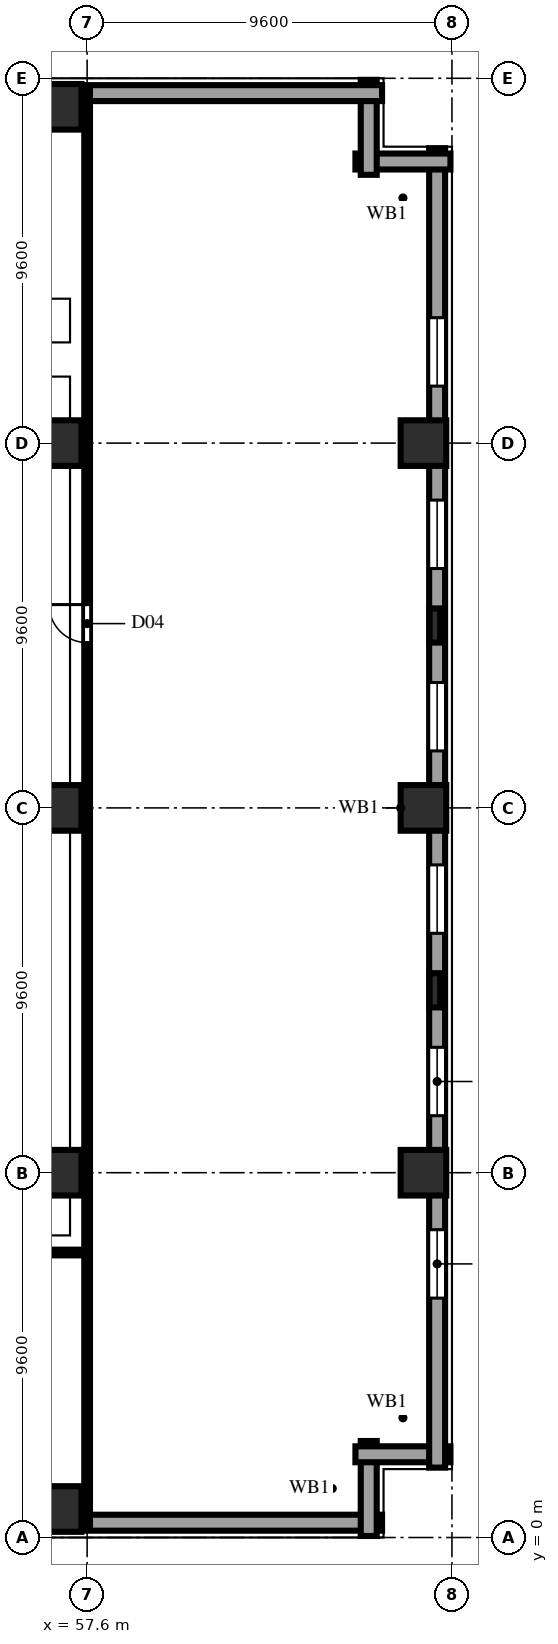
"""IFC4 building model, lengths in metres.
Left out: names, types, materials, properties, quantities, classifications, styles, units other than length and angle.
Written with IfcOpenShell. Run it as: python <this file> out.ifc"""

import sys

from ifc_helpers import new_model, si_unit, direction, frame, frame_2d, origin, origin_2d, place, context, subcontext, project, spatial, rectangle, extrude, element, fill, save


model = new_model("IFC4")
c1 = context("Model", 3, precision=1e-05, world=origin(), true_north=direction((0.0, 1.0)))
c2 = subcontext(c1, "Body", "Model", "MODEL_VIEW")
j1 = project(units=[si_unit("LENGTHUNIT", "METRE"), si_unit("PLANEANGLEUNIT", "RADIAN")], contexts=[c1])
p1 = place(None, origin())
s1 = spatial("IfcSite", under=j1, at=p1, CompositionType="ELEMENT")
p2 = place(p1, origin())
s2 = spatial("IfcBuilding", under=s1, at=p2, CompositionType="ELEMENT")
p3 = place(p2, frame((0.0, 0.0, 54.6)))
s3 = spatial("IfcBuildingStorey", under=s2, at=p3, CompositionType="ELEMENT", Elevation=54.6)
for number, where, z_axis, x_axis in (
    (1, (56.85, 0.75, 0.0), (0.0, 0.0, 1.0), (1.0, 0.0, 0.0)),
    (2, (56.85, 9.6, 0.0), (0.0, 0.0, 1.0), (1.0, 0.0, 0.0)),
    (3, (56.85, 19.2, 0.0), (0.0, 0.0, 1.0), (1.0, 0.0, 0.0)),
    (4, (56.85, 28.8, 0.0), (0.0, 0.0, 1.0), (1.0, 0.0, 0.0)),
    (5, (56.85, 37.65, 0.0), (0.0, 0.0, 1.0), (1.0, 0.0, 0.0)),
    (6, (66.45, 9.6, 0.0), (0.0, 0.0, 1.0), (1.0, 0.0, 0.0)),
    (7, (66.45, 19.2, 0.0), (0.0, 0.0, 1.0), (1.0, 0.0, 0.0)),
    (8, (66.45, 28.8, 0.0), (0.0, 0.0, 1.0), (1.0, 0.0, 0.0)),
):
    element("IfcColumn", number, at=place(p3, frame(where, z_axis=z_axis, x_axis=x_axis)), inside=s3, PredefinedType="COLUMN", context=c2, shape_type="SweptSolid", body=[
        extrude(rectangle(XDim=1.2, YDim=1.2, at=origin_2d()), origin(), (0.0, 0.0, 1.0), 3.8),
    ])
for number, where, z_axis, x_axis in (
    (9, (66.75, 14.4, 0.0), (0.0, 0.0, 1.0), (0.0, 1.0, 0.0)),
    (10, (66.75, 24.0, 0.0), (0.0, 0.0, 1.0), (0.0, 1.0, 0.0)),
):
    element("IfcColumn", number, at=place(p3, frame(where, z_axis=z_axis, x_axis=x_axis)), inside=s3, PredefinedType="PILASTER", context=c2, shape_type="SweptSolid", body=[
        extrude(rectangle(XDim=0.9, YDim=0.28, at=origin_2d()), origin(), (0.0, 0.0, 1.0), 3.8),
    ])
p4 = place(p3, frame((1.84, 0.39, 0.0), z_axis=(0.0, 0.0, 1.0), x_axis=(1.0, 0.0, 0.0)))
e11 = element("IfcWall", 11, at=p4, inside=s3, PredefinedType="SOLIDWALL", context=c2, shape_type="SweptSolid", body=[
    extrude(rectangle(XDim=63.52, YDim=0.42, at=frame_2d((31.76, 0.0))), origin(), (0.0, 0.0, 1.0), 3.54),
])
p5 = place(p4, frame((4.16, 0.0, 0.85)))
e12 = element("IfcOpeningElement", 12, at=p5, cuts=e11, PredefinedType="OPENING", context=c2, shape_type="SweptSolid", body=[
    extrude(rectangle(XDim=2.4, YDim=1.85, at=frame_2d((1.2, 0.925))), frame((0.0, 0.222, 0.0), z_axis=(0.0, -1.0, 0.0), x_axis=(1.0, 0.0, 0.0)), (0.0, 0.0, 1.0), 0.444),
])
p6 = place(p4, frame((8.96, 0.0, 0.85)))
e13 = element("IfcOpeningElement", 13, at=p6, cuts=e11, PredefinedType="OPENING", context=c2, shape_type="SweptSolid", body=[
    extrude(rectangle(XDim=2.4, YDim=1.85, at=frame_2d((1.2, 0.925))), frame((0.0, 0.222, 0.0), z_axis=(0.0, -1.0, 0.0), x_axis=(1.0, 0.0, 0.0)), (0.0, 0.0, 1.0), 0.444),
])
p7 = place(p4, frame((13.76, 0.0, 0.85)))
e14 = element("IfcOpeningElement", 14, at=p7, cuts=e11, PredefinedType="OPENING", context=c2, shape_type="SweptSolid", body=[
    extrude(rectangle(XDim=2.4, YDim=1.85, at=frame_2d((1.2, 0.925))), frame((0.0, 0.222, 0.0), z_axis=(0.0, -1.0, 0.0), x_axis=(1.0, 0.0, 0.0)), (0.0, 0.0, 1.0), 0.444),
])
p8 = place(p4, frame((18.56, 0.0, 0.85)))
e15 = element("IfcOpeningElement", 15, at=p8, cuts=e11, PredefinedType="OPENING", context=c2, shape_type="SweptSolid", body=[
    extrude(rectangle(XDim=2.4, YDim=1.85, at=frame_2d((1.2, 0.925))), frame((0.0, 0.222, 0.0), z_axis=(0.0, -1.0, 0.0), x_axis=(1.0, 0.0, 0.0)), (0.0, 0.0, 1.0), 0.444),
])
p9 = place(p4, frame((23.36, 0.0, 0.85)))
e16 = element("IfcOpeningElement", 16, at=p9, cuts=e11, PredefinedType="OPENING", context=c2, shape_type="SweptSolid", body=[
    extrude(rectangle(XDim=2.4, YDim=1.85, at=frame_2d((1.2, 0.925))), frame((0.0, 0.222, 0.0), z_axis=(0.0, -1.0, 0.0), x_axis=(1.0, 0.0, 0.0)), (0.0, 0.0, 1.0), 0.444),
])
p10 = place(p4, frame((28.16, 0.0, 0.85)))
e17 = element("IfcOpeningElement", 17, at=p10, cuts=e11, PredefinedType="OPENING", context=c2, shape_type="SweptSolid", body=[
    extrude(rectangle(XDim=2.4, YDim=1.85, at=frame_2d((1.2, 0.925))), frame((0.0, 0.222, 0.0), z_axis=(0.0, -1.0, 0.0), x_axis=(1.0, 0.0, 0.0)), (0.0, 0.0, 1.0), 0.444),
])
for number, where, z_axis, x_axis in (
    (18, (65.01, 0.04, 0.0), (0.0, 0.0, 1.0), (0.0, 1.0, 0.0)),
    (19, (64.66, 2.19, 0.0), (0.0, 0.0, 1.0), (1.0, 0.0, 0.0)),
):
    element("IfcWall", number, at=place(p3, frame(where, z_axis=z_axis, x_axis=x_axis)), inside=s3, PredefinedType="SOLIDWALL", context=c2, shape_type="SweptSolid", body=[
        extrude(rectangle(XDim=2.5, YDim=0.42, at=frame_2d((1.25, 0.0))), origin(), (0.0, 0.0, 1.0), 3.54),
    ])
p11 = place(p3, frame((66.81, 1.84, 0.0), z_axis=(0.0, 0.0, 1.0), x_axis=(0.0, 1.0, 0.0)))
e20 = element("IfcWall", 20, at=p11, inside=s3, PredefinedType="SOLIDWALL", context=c2, shape_type="SweptSolid", body=[
    extrude(rectangle(XDim=34.72, YDim=0.42, at=frame_2d((17.36, 0.0))), origin(), (0.0, 0.0, 1.0), 3.54),
])
p12 = place(p11, frame((4.46, 0.0, 0.85)))
e21 = element("IfcOpeningElement", 21, at=p12, cuts=e20, PredefinedType="OPENING", context=c2, shape_type="SweptSolid", body=[
    extrude(rectangle(XDim=1.8, YDim=1.85, at=frame_2d((0.9, 0.925))), frame((0.0, 0.222, 0.0), z_axis=(0.0, -1.0, 0.0), x_axis=(1.0, 0.0, 0.0)), (0.0, 0.0, 1.0), 0.444),
])
p13 = place(p11, frame((9.26, 0.0, 0.85)))
e22 = element("IfcOpeningElement", 22, at=p13, cuts=e20, PredefinedType="OPENING", context=c2, shape_type="SweptSolid", body=[
    extrude(rectangle(XDim=1.8, YDim=1.85, at=frame_2d((0.9, 0.925))), frame((0.0, 0.222, 0.0), z_axis=(0.0, -1.0, 0.0), x_axis=(1.0, 0.0, 0.0)), (0.0, 0.0, 1.0), 0.444),
])
p14 = place(p11, frame((14.06, 0.0, 0.85)))
e23 = element("IfcOpeningElement", 23, at=p14, cuts=e20, PredefinedType="OPENING", context=c2, shape_type="SweptSolid", body=[
    extrude(rectangle(XDim=1.8, YDim=1.85, at=frame_2d((0.9, 0.925))), frame((0.0, 0.222, 0.0), z_axis=(0.0, -1.0, 0.0), x_axis=(1.0, 0.0, 0.0)), (0.0, 0.0, 1.0), 0.444),
])
p15 = place(p11, frame((18.86, 0.0, 0.85)))
e24 = element("IfcOpeningElement", 24, at=p15, cuts=e20, PredefinedType="OPENING", context=c2, shape_type="SweptSolid", body=[
    extrude(rectangle(XDim=1.8, YDim=1.85, at=frame_2d((0.9, 0.925))), frame((0.0, 0.222, 0.0), z_axis=(0.0, -1.0, 0.0), x_axis=(1.0, 0.0, 0.0)), (0.0, 0.0, 1.0), 0.444),
])
p16 = place(p11, frame((23.66, 0.0, 0.85)))
e25 = element("IfcOpeningElement", 25, at=p16, cuts=e20, PredefinedType="OPENING", context=c2, shape_type="SweptSolid", body=[
    extrude(rectangle(XDim=1.8, YDim=1.85, at=frame_2d((0.9, 0.925))), frame((0.0, 0.222, 0.0), z_axis=(0.0, -1.0, 0.0), x_axis=(1.0, 0.0, 0.0)), (0.0, 0.0, 1.0), 0.444),
])
p17 = place(p11, frame((28.46, 0.0, 0.85)))
e26 = element("IfcOpeningElement", 26, at=p17, cuts=e20, PredefinedType="OPENING", context=c2, shape_type="SweptSolid", body=[
    extrude(rectangle(XDim=1.8, YDim=1.85, at=frame_2d((0.9, 0.925))), frame((0.0, 0.222, 0.0), z_axis=(0.0, -1.0, 0.0), x_axis=(1.0, 0.0, 0.0)), (0.0, 0.0, 1.0), 0.444),
])
for number, where, z_axis, x_axis in (
    (27, (67.16, 36.21, 0.0), (0.0, 0.0, 1.0), (-1.0, 0.0, 0.0)),
    (28, (65.01, 35.86, 0.0), (0.0, 0.0, 1.0), (0.0, 1.0, 0.0)),
):
    element("IfcWall", number, at=place(p3, frame(where, z_axis=z_axis, x_axis=x_axis)), inside=s3, PredefinedType="SOLIDWALL", context=c2, shape_type="SweptSolid", body=[
        extrude(rectangle(XDim=2.5, YDim=0.42, at=frame_2d((1.25, 0.0))), origin(), (0.0, 0.0, 1.0), 3.54),
    ])
p18 = place(p3, frame((65.36, 38.01, 0.0), z_axis=(0.0, 0.0, 1.0), x_axis=(-1.0, 0.0, 0.0)))
e29 = element("IfcWall", 29, at=p18, inside=s3, PredefinedType="SOLIDWALL", context=c2, shape_type="SweptSolid", body=[
    extrude(rectangle(XDim=27.7, YDim=0.42, at=frame_2d((13.85, 0.0))), origin(), (0.0, 0.0, 1.0), 3.54),
])
p19 = place(p3, frame((0.22, 7.5, 0.0), z_axis=(0.0, 0.0, 1.0), x_axis=(1.0, 0.0, 0.0)))
e30 = element("IfcWall", 30, at=p19, inside=s3, PredefinedType="PARTITIONING", context=c2, shape_type="SweptSolid", body=[
    extrude(rectangle(XDim=57.38, YDim=0.15, at=frame_2d((28.69, 0.0))), origin(), (0.0, 0.0, 1.0), 3.54),
])
p20 = place(p19, frame((13.68, 0.0, 0.0)))
e31 = element("IfcOpeningElement", 31, at=p20, cuts=e30, PredefinedType="OPENING", context=c2, shape_type="SweptSolid", body=[
    extrude(rectangle(XDim=1.0, YDim=2.2, at=frame_2d((0.5, 1.1))), frame((0.0, 0.087, 0.0), z_axis=(0.0, -1.0, 0.0), x_axis=(1.0, 0.0, 0.0)), (0.0, 0.0, 1.0), 0.174),
])
p21 = place(p19, frame((23.28, 0.0, 0.0)))
e32 = element("IfcOpeningElement", 32, at=p21, cuts=e30, PredefinedType="OPENING", context=c2, shape_type="SweptSolid", body=[
    extrude(rectangle(XDim=1.0, YDim=2.2, at=frame_2d((0.5, 1.1))), frame((0.0, 0.087, 0.0), z_axis=(0.0, -1.0, 0.0), x_axis=(1.0, 0.0, 0.0)), (0.0, 0.0, 1.0), 0.174),
])
p22 = place(p19, frame((51.23, 0.0, 0.0)))
e33 = element("IfcOpeningElement", 33, at=p22, cuts=e30, PredefinedType="OPENING", context=c2, shape_type="SweptSolid", body=[
    extrude(rectangle(XDim=1.2, YDim=2.2, at=frame_2d((0.6, 1.1))), frame((0.0, 0.087, 0.0), z_axis=(0.0, -1.0, 0.0), x_axis=(1.0, 0.0, 0.0)), (0.0, 0.0, 1.0), 0.174),
])
p23 = place(p3, frame((57.6, 0.22, 0.0), z_axis=(0.0, 0.0, 1.0), x_axis=(0.0, 1.0, 0.0)))
e34 = element("IfcWall", 34, at=p23, inside=s3, PredefinedType="PARTITIONING", context=c2, shape_type="SweptSolid", body=[
    extrude(rectangle(XDim=37.96, YDim=0.15, at=frame_2d((18.98, 0.0))), origin(), (0.0, 0.0, 1.0), 3.54),
])
p24 = place(p23, frame((23.33, 0.0, 0.0)))
e35 = element("IfcOpeningElement", 35, at=p24, cuts=e34, PredefinedType="OPENING", context=c2, shape_type="SweptSolid", body=[
    extrude(rectangle(XDim=1.0, YDim=2.2, at=frame_2d((0.5, 1.1))), frame((0.0, 0.087, 0.0), z_axis=(0.0, -1.0, 0.0), x_axis=(1.0, 0.0, 0.0)), (0.0, 0.0, 1.0), 0.174),
])
p25 = place(p12, origin())
e36 = element("IfcWindow", 36, at=p25, inside=s3, PartitioningType="DOUBLE_PANEL_VERTICAL", PredefinedType="WINDOW", context=c2, shape_type="SweptSolid", body=[
    extrude(rectangle(XDim=1.8, YDim=1.85, at=frame_2d((0.9, 0.925))), frame((0.0, 0.11, 0.0), z_axis=(0.0, -1.0, 0.0), x_axis=(1.0, 0.0, 0.0)), (0.0, 0.0, 1.0), 0.06),
])
fill(e21, e36)
p26 = place(p13, origin())
e37 = element("IfcWindow", 37, at=p26, inside=s3, PartitioningType="DOUBLE_PANEL_VERTICAL", PredefinedType="WINDOW", context=c2, shape_type="SweptSolid", body=[
    extrude(rectangle(XDim=1.8, YDim=1.85, at=frame_2d((0.9, 0.925))), frame((0.0, 0.11, 0.0), z_axis=(0.0, -1.0, 0.0), x_axis=(1.0, 0.0, 0.0)), (0.0, 0.0, 1.0), 0.06),
])
fill(e22, e37)
p27 = place(p14, origin())
e38 = element("IfcWindow", 38, at=p27, inside=s3, PartitioningType="DOUBLE_PANEL_VERTICAL", PredefinedType="WINDOW", context=c2, shape_type="SweptSolid", body=[
    extrude(rectangle(XDim=1.8, YDim=1.85, at=frame_2d((0.9, 0.925))), frame((0.0, 0.11, 0.0), z_axis=(0.0, -1.0, 0.0), x_axis=(1.0, 0.0, 0.0)), (0.0, 0.0, 1.0), 0.06),
])
fill(e23, e38)
p28 = place(p15, origin())
e39 = element("IfcWindow", 39, at=p28, inside=s3, PartitioningType="DOUBLE_PANEL_VERTICAL", PredefinedType="WINDOW", context=c2, shape_type="SweptSolid", body=[
    extrude(rectangle(XDim=1.8, YDim=1.85, at=frame_2d((0.9, 0.925))), frame((0.0, 0.11, 0.0), z_axis=(0.0, -1.0, 0.0), x_axis=(1.0, 0.0, 0.0)), (0.0, 0.0, 1.0), 0.06),
])
fill(e24, e39)
p29 = place(p16, origin())
e40 = element("IfcWindow", 40, at=p29, inside=s3, PartitioningType="DOUBLE_PANEL_VERTICAL", PredefinedType="WINDOW", context=c2, shape_type="SweptSolid", body=[
    extrude(rectangle(XDim=1.8, YDim=1.85, at=frame_2d((0.9, 0.925))), frame((0.0, 0.11, 0.0), z_axis=(0.0, -1.0, 0.0), x_axis=(1.0, 0.0, 0.0)), (0.0, 0.0, 1.0), 0.06),
])
fill(e25, e40)
p30 = place(p17, origin())
e41 = element("IfcWindow", 41, at=p30, inside=s3, PartitioningType="DOUBLE_PANEL_VERTICAL", PredefinedType="WINDOW", context=c2, shape_type="SweptSolid", body=[
    extrude(rectangle(XDim=1.8, YDim=1.85, at=frame_2d((0.9, 0.925))), frame((0.0, 0.11, 0.0), z_axis=(0.0, -1.0, 0.0), x_axis=(1.0, 0.0, 0.0)), (0.0, 0.0, 1.0), 0.06),
])
fill(e26, e41)
p31 = place(p24, origin())
e42 = element("IfcDoor", 42, at=p31, inside=s3, OperationType="SINGLE_SWING_RIGHT", PredefinedType="DOOR", context=c2, shape_type="SweptSolid", body=[
    extrude(rectangle(XDim=1.0, YDim=2.2, at=frame_2d((0.5, 1.1))), frame((0.0, 0.025, 0.0), z_axis=(0.0, -1.0, 0.0), x_axis=(1.0, 0.0, 0.0)), (0.0, 0.0, 1.0), 0.05),
])
fill(e35, e42)
save(model, sys.argv[1])
